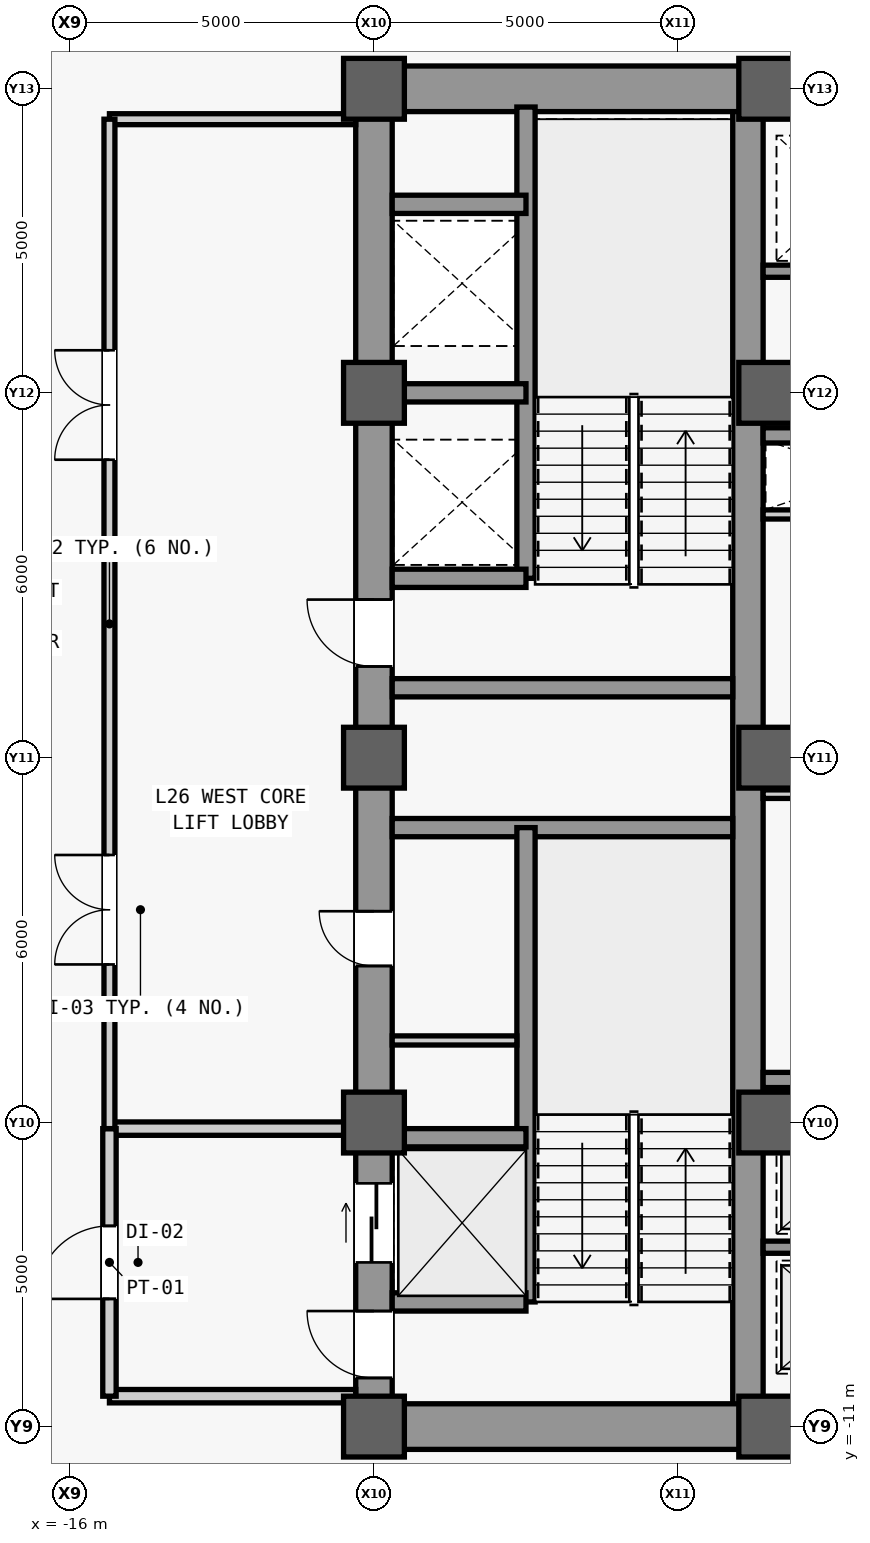
"""IFC4 building model, lengths in metres.
Left out: names, types, materials, properties, quantities, classifications, styles, units other than length and angle.
Written with IfcOpenShell. Run it as: python <this file> out.ifc"""

import sys

from ifc_helpers import new_model, si_unit, direction, frame, frame_2d, origin, origin_2d, place, context, subcontext, project, spatial, rectangle, extrude, source, transform, mapped, element, fill, save


model = new_model("IFC4")
c1 = context("Model", 3, precision=1e-05, world=origin(), true_north=direction((0.0, 1.0)))
c2 = subcontext(c1, "Body", "Model", "MODEL_VIEW")
j1 = project(units=[si_unit("LENGTHUNIT", "METRE"), si_unit("PLANEANGLEUNIT", "RADIAN")], contexts=[c1])
p1 = place(None, origin())
s1 = spatial("IfcSite", under=j1, at=p1, CompositionType="ELEMENT")
p2 = place(p1, origin())
s2 = spatial("IfcBuilding", under=s1, at=p2, CompositionType="ELEMENT")
p3 = place(p2, frame((0.0, 0.0, 116.0)))
s3 = spatial("IfcBuildingStorey", under=s2, at=p3, CompositionType="ELEMENT", Elevation=116.0)
m1 = source(origin(), c2, "Body", "SweptSolid", [
    extrude(rectangle(XDim=22.0, YDim=0.6, at=frame_2d((11.0, 0.0))), origin(), (0.0, 0.0, 1.0), 3.84),
])
p4 = place(p3, frame((-11.0, -11.0, 0.0), z_axis=(0.0, 0.0, 1.0), x_axis=(0.0, 1.0, 0.0)))
e1 = element("IfcWall", 1, at=p4, inside=s3, PredefinedType="SHEAR", context=c2, shape_type="MappedRepresentation", body=[
    mapped(m1, transform((0.0, 0.0, 0.0), scale=1.0)),
])
m2 = source(origin(), c2, "Body", "SweptSolid", [
    extrude(rectangle(XDim=1.1, YDim=2.2, at=frame_2d((0.55, 1.1))), frame((0.0, 0.31, 0.0), z_axis=(0.0, -1.0, 0.0), x_axis=(1.0, 0.0, 0.0)), (0.0, 0.0, 1.0), 0.62),
])
p5 = place(p4, frame((0.8, 0.0, 0.0)))
e2 = element("IfcOpeningElement", 2, at=p5, cuts=e1, PredefinedType="OPENING", context=c2, shape_type="MappedRepresentation", body=[
    mapped(m2, transform((0.0, 0.0, 0.0), scale=1.0)),
])
p6 = place(p4, frame((12.5, 0.0, 0.0)))
e3 = element("IfcOpeningElement", 3, at=p6, cuts=e1, PredefinedType="OPENING", context=c2, shape_type="MappedRepresentation", body=[
    mapped(m2, transform((0.0, 0.0, 0.0), scale=1.0)),
])
m3 = source(origin(), c2, "Body", "SweptSolid", [
    extrude(rectangle(XDim=0.9, YDim=2.15, at=frame_2d((0.45, 1.075))), frame((0.0, 0.31, 0.0), z_axis=(0.0, -1.0, 0.0), x_axis=(1.0, 0.0, 0.0)), (0.0, 0.0, 1.0), 0.62),
])
p7 = place(p4, frame((7.575, 0.0, 0.0)))
e4 = element("IfcOpeningElement", 4, at=p7, cuts=e1, PredefinedType="OPENING", context=c2, shape_type="MappedRepresentation", body=[
    mapped(m3, transform((0.0, 0.0, 0.0), scale=1.0)),
])
m4 = source(origin(), c2, "Body", "SweptSolid", [
    extrude(rectangle(XDim=1.3, YDim=2.3, at=frame_2d((0.65, 1.15))), frame((0.0, 0.31, 0.0), z_axis=(0.0, -1.0, 0.0), x_axis=(1.0, 0.0, 0.0)), (0.0, 0.0, 1.0), 0.62),
])
p8 = place(p4, frame((2.7, 0.0, 0.0)))
e5 = element("IfcOpeningElement", 5, at=p8, cuts=e1, PredefinedType="OPENING", context=c2, shape_type="MappedRepresentation", body=[
    mapped(m4, transform((0.0, 0.0, 0.0), scale=1.0)),
])
m5 = source(origin(), c2, "Body", "SweptSolid", [
    extrude(rectangle(XDim=21.4, YDim=0.5, at=frame_2d((10.7, 0.0))), origin(), (0.0, 0.0, 1.0), 3.84),
])
p9 = place(p3, frame((-4.85, -10.7, 0.0), z_axis=(0.0, 0.0, 1.0), x_axis=(0.0, 1.0, 0.0)))
e6 = element("IfcWall", 6, at=p9, inside=s3, PredefinedType="SHEAR", context=c2, shape_type="MappedRepresentation", body=[
    mapped(m5, transform((0.0, 0.0, 0.0), scale=1.0)),
])
m6 = source(origin(), c2, "Body", "SweptSolid", [
    extrude(rectangle(XDim=5.85, YDim=0.75, at=frame_2d((2.925, 0.0))), origin(), (0.0, 0.0, 1.0), 3.84),
])
for number, where, z_axis, x_axis in (
    (7, (-10.7, -11.0, 0.0), (0.0, 0.0, 1.0), (1.0, 0.0, 0.0)),
    (8, (-10.7, 11.0, 0.0), (0.0, 0.0, 1.0), (1.0, 0.0, 0.0)),
):
    element("IfcWall", number, at=place(p3, frame(where, z_axis=z_axis, x_axis=x_axis)), inside=s3, PredefinedType="SHEAR", context=c2, shape_type="MappedRepresentation", body=[
        mapped(m6, transform((0.0, 0.0, 0.0), scale=1.0)),
    ])
m7 = source(origin(), c2, "Body", "SweptSolid", [
    extrude(rectangle(XDim=5.6, YDim=0.3, at=frame_2d((2.8, 0.0))), origin(), (0.0, 0.0, 1.0), 3.84),
])
for number, where, z_axis, x_axis in (
    (9, (-10.7, -1.15, 0.0), (0.0, 0.0, 1.0), (1.0, 0.0, 0.0)),
    (10, (-10.7, 1.15, 0.0), (0.0, 0.0, 1.0), (1.0, 0.0, 0.0)),
):
    element("IfcWall", number, at=place(p3, frame(where, z_axis=z_axis, x_axis=x_axis)), inside=s3, PredefinedType="SHEAR", context=c2, shape_type="MappedRepresentation", body=[
        mapped(m7, transform((0.0, 0.0, 0.0), scale=1.0)),
    ])
m8 = source(origin(), c2, "Body", "SweptSolid", [
    extrude(rectangle(XDim=9.2, YDim=0.5, at=frame_2d((4.6, 0.0))), origin(), (0.0, 0.0, 1.0), 3.84),
])
p10 = place(p3, frame((-4.6, -11.0, 0.0), z_axis=(0.0, 0.0, 1.0), x_axis=(1.0, 0.0, 0.0)))
e11 = element("IfcWall", 11, at=p10, inside=s3, PredefinedType="SHEAR", context=c2, shape_type="MappedRepresentation", body=[
    mapped(m8, transform((0.0, 0.0, 0.0), scale=1.0)),
])
m9 = source(origin(), c2, "Body", "SweptSolid", [
    extrude(rectangle(XDim=1.8, YDim=2.25, at=frame_2d((0.9, 1.125))), frame((0.0, 0.26, 0.0), z_axis=(0.0, -1.0, 0.0), x_axis=(1.0, 0.0, 0.0)), (0.0, 0.0, 1.0), 0.52),
])
p11 = place(p10, frame((3.7, 0.0, 0.0)))
e12 = element("IfcOpeningElement", 12, at=p11, cuts=e11, PredefinedType="OPENING", context=c2, shape_type="MappedRepresentation", body=[
    mapped(m9, transform((0.0, 0.0, 0.0), scale=1.0)),
])
p12 = place(p3, frame((-4.6, 11.0, 0.0), z_axis=(0.0, 0.0, 1.0), x_axis=(1.0, 0.0, 0.0)))
e13 = element("IfcWall", 13, at=p12, inside=s3, PredefinedType="SHEAR", context=c2, shape_type="MappedRepresentation", body=[
    mapped(m8, transform((0.0, 0.0, 0.0), scale=1.0)),
])
p13 = place(p12, frame((3.7, 0.0, 0.0)))
e14 = element("IfcOpeningElement", 14, at=p13, cuts=e13, PredefinedType="OPENING", context=c2, shape_type="MappedRepresentation", body=[
    mapped(m9, transform((0.0, 0.0, 0.0), scale=1.0)),
])
m10 = source(origin(), c2, "Body", "SweptSolid", [
    extrude(rectangle(XDim=1.0, YDim=1.0, at=origin_2d()), origin(), (0.0, 0.0, 1.0), 4.1),
])
for number, where, z_axis, x_axis in (
    (15, (-11.0, -11.0, 0.0), (0.0, 0.0, 1.0), (1.0, 0.0, 0.0)),
    (16, (-11.0, -6.0, 0.0), (0.0, 0.0, 1.0), (1.0, 0.0, 0.0)),
    (17, (-11.0, 0.0, 0.0), (0.0, 0.0, 1.0), (1.0, 0.0, 0.0)),
    (18, (-11.0, 6.0, 0.0), (0.0, 0.0, 1.0), (1.0, 0.0, 0.0)),
    (19, (-11.0, 11.0, 0.0), (0.0, 0.0, 1.0), (1.0, 0.0, 0.0)),
    (20, (-4.5, -11.0, 0.0), (0.0, 0.0, 1.0), (1.0, 0.0, 0.0)),
    (21, (-4.5, -6.0, 0.0), (0.0, 0.0, 1.0), (1.0, 0.0, 0.0)),
    (22, (-4.5, 0.0, 0.0), (0.0, 0.0, 1.0), (1.0, 0.0, 0.0)),
    (23, (-4.5, 6.0, 0.0), (0.0, 0.0, 1.0), (1.0, 0.0, 0.0)),
    (24, (-4.5, 11.0, 0.0), (0.0, 0.0, 1.0), (1.0, 0.0, 0.0)),
):
    element("IfcColumn", number, at=place(p3, frame(where, z_axis=z_axis, x_axis=x_axis)), inside=s3, PredefinedType="COLUMN", context=c2, shape_type="MappedRepresentation", body=[
        mapped(m10, transform((0.0, 0.0, 0.0), scale=1.0)),
    ])
m11 = source(origin(), c2, "Body", "SweptSolid", [
    extrude(rectangle(XDim=7.8, YDim=0.3, at=frame_2d((3.9, 0.0))), origin(), (0.0, 0.0, 1.0), 3.84),
])
p14 = place(p3, frame((-8.5, -8.95, 0.0), z_axis=(0.0, 0.0, 1.0), x_axis=(0.0, 1.0, 0.0)))
e25 = element("IfcWall", 25, at=p14, inside=s3, PredefinedType="SHEAR", context=c2, shape_type="MappedRepresentation", body=[
    mapped(m11, transform((0.0, 0.0, 0.0), scale=1.0)),
])
m12 = source(origin(), c2, "Body", "SweptSolid", [
    extrude(rectangle(XDim=2.2, YDim=0.3, at=frame_2d((1.1, 0.0))), origin(), (0.0, 0.0, 1.0), 3.84),
])
for number, where, z_axis, x_axis in (
    (26, (-10.7, -8.95, 0.0), (0.0, 0.0, 1.0), (1.0, 0.0, 0.0)),
    (27, (-10.7, -6.25, 0.0), (0.0, 0.0, 1.0), (1.0, 0.0, 0.0)),
):
    element("IfcWall", number, at=place(p3, frame(where, z_axis=z_axis, x_axis=x_axis)), inside=s3, PredefinedType="SHEAR", context=c2, shape_type="MappedRepresentation", body=[
        mapped(m12, transform((0.0, 0.0, 0.0), scale=1.0)),
    ])
m13 = source(origin(), c2, "Body", "SweptSolid", [
    extrude(rectangle(XDim=7.75, YDim=0.3, at=frame_2d((3.875, 0.0))), origin(), (0.0, 0.0, 1.0), 3.84),
])
p15 = place(p3, frame((-8.5, 2.95, 0.0), z_axis=(0.0, 0.0, 1.0), x_axis=(0.0, 1.0, 0.0)))
e28 = element("IfcWall", 28, at=p15, inside=s3, PredefinedType="SHEAR", context=c2, shape_type="MappedRepresentation", body=[
    mapped(m13, transform((0.0, 0.0, 0.0), scale=1.0)),
])
for number, where, z_axis, x_axis in (
    (29, (-10.7, 2.95, 0.0), (0.0, 0.0, 1.0), (1.0, 0.0, 0.0)),
    (30, (-10.7, 6.0, 0.0), (0.0, 0.0, 1.0), (1.0, 0.0, 0.0)),
    (31, (-10.7, 9.1, 0.0), (0.0, 0.0, 1.0), (1.0, 0.0, 0.0)),
):
    element("IfcWall", number, at=place(p3, frame(where, z_axis=z_axis, x_axis=x_axis)), inside=s3, PredefinedType="SHEAR", context=c2, shape_type="MappedRepresentation", body=[
        mapped(m12, transform((0.0, 0.0, 0.0), scale=1.0)),
    ])
m14 = source(origin(), c2, "Body", "SweptSolid", [
    extrude(rectangle(XDim=2.05, YDim=0.15, at=frame_2d((1.025, 0.0))), origin(), (0.0, 0.0, 1.0), 3.84),
])
p16 = place(p3, frame((-10.7, -4.65, 0.0), z_axis=(0.0, 0.0, 1.0), x_axis=(1.0, 0.0, 0.0)))
e32 = element("IfcWall", 32, at=p16, inside=s3, PredefinedType="PARTITIONING", context=c2, shape_type="MappedRepresentation", body=[
    mapped(m14, transform((0.0, 0.0, 0.0), scale=1.0)),
])
m15 = source(origin(), c2, "Body", "SweptSolid", [
    extrude(rectangle(XDim=4.05, YDim=0.22, at=frame_2d((2.025, 0.0))), origin(), (0.0, 0.0, 1.0), 3.84),
])
p17 = place(p3, frame((-15.35, -10.5, 0.0), z_axis=(0.0, 0.0, 1.0), x_axis=(1.0, 0.0, 0.0)))
e33 = element("IfcWall", 33, at=p17, inside=s3, PredefinedType="PARTITIONING", context=c2, shape_type="MappedRepresentation", body=[
    mapped(m15, transform((0.0, 0.0, 0.0), scale=1.0)),
])
m16 = source(origin(), c2, "Body", "SweptSolid", [
    extrude(rectangle(XDim=4.05, YDim=0.22, at=frame_2d((2.025, 0.0))), origin(), (0.0, 0.0, 1.0), 3.067),
])
p18 = place(p3, frame((-15.35, -6.1, 0.0), z_axis=(0.0, 0.0, 1.0), x_axis=(1.0, 0.0, 0.0)))
e34 = element("IfcWall", 34, at=p18, inside=s3, PredefinedType="PARTITIONING", context=c2, shape_type="MappedRepresentation", body=[
    mapped(m16, transform((0.0, 0.0, 0.0), scale=1.0)),
])
m17 = source(origin(), c2, "Body", "SweptSolid", [
    extrude(rectangle(XDim=4.4, YDim=0.22, at=frame_2d((2.2, 0.0))), origin(), (0.0, 0.0, 1.0), 3.84),
])
p19 = place(p3, frame((-15.35, -10.5, 0.0), z_axis=(0.0, 0.0, 1.0), x_axis=(0.0, 1.0, 0.0)))
e35 = element("IfcWall", 35, at=p19, inside=s3, PredefinedType="PARTITIONING", context=c2, shape_type="MappedRepresentation", body=[
    mapped(m17, transform((0.0, 0.0, 0.0), scale=1.0)),
])
m18 = source(origin(), c2, "Body", "SweptSolid", [
    extrude(rectangle(XDim=1.2, YDim=2.2, at=frame_2d((0.6, 1.1))), frame((0.0, 0.12, 0.0), z_axis=(0.0, -1.0, 0.0), x_axis=(1.0, 0.0, 0.0)), (0.0, 0.0, 1.0), 0.24),
])
p20 = place(p19, frame((1.6, 0.0, 0.0)))
e36 = element("IfcOpeningElement", 36, at=p20, cuts=e35, PredefinedType="OPENING", context=c2, shape_type="MappedRepresentation", body=[
    mapped(m18, transform((0.0, 0.0, 0.0), scale=1.0)),
])
m19 = source(origin(), c2, "Body", "SweptSolid", [
    extrude(rectangle(XDim=4.05, YDim=0.18, at=frame_2d((2.025, 0.0))), origin(), (0.0, 0.0, 1.0), 3.84),
])
p21 = place(p3, frame((-15.35, 10.5, 0.0), z_axis=(0.0, 0.0, 1.0), x_axis=(1.0, 0.0, 0.0)))
e37 = element("IfcWall", 37, at=p21, inside=s3, PredefinedType="PARTITIONING", context=c2, shape_type="MappedRepresentation", body=[
    mapped(m19, transform((0.0, 0.0, 0.0), scale=1.0)),
])
m20 = source(origin(), c2, "Body", "SweptSolid", [
    extrude(rectangle(XDim=16.6, YDim=0.18, at=frame_2d((8.3, 0.0))), origin(), (0.0, 0.0, 1.0), 3.84),
])
p22 = place(p3, frame((-15.35, -6.1, 0.0), z_axis=(0.0, 0.0, 1.0), x_axis=(0.0, 1.0, 0.0)))
e38 = element("IfcWall", 38, at=p22, inside=s3, PredefinedType="PARTITIONING", context=c2, shape_type="MappedRepresentation", body=[
    mapped(m20, transform((0.0, 0.0, 0.0), scale=1.0)),
])
m21 = source(origin(), c2, "Body", "SweptSolid", [
    extrude(rectangle(XDim=1.8, YDim=2.25, at=frame_2d((0.9, 1.125))), frame((0.0, 0.1, 0.0), z_axis=(0.0, -1.0, 0.0), x_axis=(1.0, 0.0, 0.0)), (0.0, 0.0, 1.0), 0.2),
])
p23 = place(p22, frame((2.7, 0.0, 0.0)))
e39 = element("IfcOpeningElement", 39, at=p23, cuts=e38, PredefinedType="OPENING", context=c2, shape_type="MappedRepresentation", body=[
    mapped(m21, transform((0.0, 0.0, 0.0), scale=1.0)),
])
p24 = place(p22, frame((11.0, 0.0, 0.0)))
e40 = element("IfcOpeningElement", 40, at=p24, cuts=e38, PredefinedType="OPENING", context=c2, shape_type="MappedRepresentation", body=[
    mapped(m21, transform((0.0, 0.0, 0.0), scale=1.0)),
])
m22 = source(origin(), c2, "Body", "SweptSolid", [
    extrude(rectangle(XDim=3.45, YDim=0.15, at=frame_2d((1.725, 0.0))), origin(), (0.0, 0.0, 1.0), 3.84),
])
p25 = place(p3, frame((-4.6, 4.0, 0.0), z_axis=(0.0, 0.0, 1.0), x_axis=(1.0, 0.0, 0.0)))
e41 = element("IfcWall", 41, at=p25, inside=s3, PredefinedType="PARTITIONING", context=c2, shape_type="MappedRepresentation", body=[
    mapped(m22, transform((0.0, 0.0, 0.0), scale=1.0)),
])
m23 = source(origin(), c2, "Body", "SweptSolid", [
    extrude(rectangle(XDim=2.45, YDim=0.2, at=frame_2d((1.225, 0.0))), origin(), (0.0, 0.0, 1.0), 3.84),
])
p26 = place(p3, frame((-4.6, -8.05, 0.0), z_axis=(0.0, 0.0, 1.0), x_axis=(1.0, 0.0, 0.0)))
e42 = element("IfcWall", 42, at=p26, inside=s3, PredefinedType="SHEAR", context=c2, shape_type="MappedRepresentation", body=[
    mapped(m23, transform((0.0, 0.0, 0.0), scale=1.0)),
])
m24 = source(origin(), c2, "Body", "SweptSolid", [
    extrude(rectangle(XDim=9.2, YDim=0.25, at=frame_2d((4.6, 0.0))), origin(), (0.0, 0.0, 1.0), 3.84),
])
p27 = place(p3, frame((-4.6, -5.3, 0.0), z_axis=(0.0, 0.0, 1.0), x_axis=(1.0, 0.0, 0.0)))
e43 = element("IfcWall", 43, at=p27, inside=s3, PredefinedType="SHEAR", context=c2, shape_type="MappedRepresentation", body=[
    mapped(m24, transform((0.0, 0.0, 0.0), scale=1.0)),
])
m25 = source(origin(), c2, "Body", "SweptSolid", [
    extrude(rectangle(XDim=1.05, YDim=2.2, at=frame_2d((0.525, 1.1))), frame((0.0, 0.135, 0.0), z_axis=(0.0, -1.0, 0.0), x_axis=(1.0, 0.0, 0.0)), (0.0, 0.0, 1.0), 0.27),
])
p28 = place(p27, frame((4.075, 0.0, 0.0)))
e44 = element("IfcOpeningElement", 44, at=p28, cuts=e43, PredefinedType="OPENING", context=c2, shape_type="MappedRepresentation", body=[
    mapped(m25, transform((0.0, 0.0, 0.0), scale=1.0)),
])
p29 = place(p3, frame((-4.6, 8.0, 0.0), z_axis=(0.0, 0.0, 1.0), x_axis=(1.0, 0.0, 0.0)))
e45 = element("IfcWall", 45, at=p29, inside=s3, PredefinedType="SHEAR", context=c2, shape_type="MappedRepresentation", body=[
    mapped(m23, transform((0.0, 0.0, 0.0), scale=1.0)),
])
p30 = place(p3, frame((-4.6, 5.3, 0.0), z_axis=(0.0, 0.0, 1.0), x_axis=(1.0, 0.0, 0.0)))
e46 = element("IfcWall", 46, at=p30, inside=s3, PredefinedType="SHEAR", context=c2, shape_type="MappedRepresentation", body=[
    mapped(m24, transform((0.0, 0.0, 0.0), scale=1.0)),
])
p31 = place(p30, frame((4.075, 0.0, 0.0)))
e47 = element("IfcOpeningElement", 47, at=p31, cuts=e46, PredefinedType="OPENING", context=c2, shape_type="MappedRepresentation", body=[
    mapped(m25, transform((0.0, 0.0, 0.0), scale=1.0)),
])
m26 = source(origin(), c2, "Body", "SweptSolid", [
    extrude(rectangle(XDim=3.45, YDim=0.14, at=frame_2d((1.725, 0.0))), origin(), (0.0, 0.0, 1.0), 3.84),
])
p32 = place(p3, frame((-4.6, -0.6, 0.0), z_axis=(0.0, 0.0, 1.0), x_axis=(1.0, 0.0, 0.0)))
e48 = element("IfcWall", 48, at=p32, inside=s3, PredefinedType="PARTITIONING", context=c2, shape_type="MappedRepresentation", body=[
    mapped(m26, transform((0.0, 0.0, 0.0), scale=1.0)),
])
m27 = source(origin(), c2, "Body", "SweptSolid", [
    extrude(rectangle(XDim=1.1, YDim=2.2, at=frame_2d((0.55, 1.1))), frame((0.0, 0.025, 0.0), z_axis=(0.0, -1.0, 0.0), x_axis=(1.0, 0.0, 0.0)), (0.0, 0.0, 1.0), 0.05),
])
p33 = place(p5, origin())
e49 = element("IfcDoor", 49, at=p33, inside=s3, OperationType="SINGLE_SWING_RIGHT", PredefinedType="DOOR", context=c2, shape_type="MappedRepresentation", body=[
    mapped(m27, transform((0.0, 0.0, 0.0), scale=1.0)),
])
fill(e2, e49)
p34 = place(p6, origin())
e50 = element("IfcDoor", 50, at=p34, inside=s3, OperationType="SINGLE_SWING_RIGHT", PredefinedType="DOOR", context=c2, shape_type="MappedRepresentation", body=[
    mapped(m27, transform((0.0, 0.0, 0.0), scale=1.0)),
])
fill(e3, e50)
m28 = source(origin(), c2, "Body", "SweptSolid", [
    extrude(rectangle(XDim=0.9, YDim=2.15, at=frame_2d((0.45, 1.075))), frame((0.0, 0.025, 0.0), z_axis=(0.0, -1.0, 0.0), x_axis=(1.0, 0.0, 0.0)), (0.0, 0.0, 1.0), 0.05),
])
p35 = place(p7, origin())
e51 = element("IfcDoor", 51, at=p35, inside=s3, OperationType="SINGLE_SWING_RIGHT", PredefinedType="DOOR", context=c2, shape_type="MappedRepresentation", body=[
    mapped(m28, transform((0.0, 0.0, 0.0), scale=1.0)),
])
fill(e4, e51)
m29 = source(origin(), c2, "Body", "SweptSolid", [
    extrude(rectangle(XDim=1.2, YDim=2.2, at=frame_2d((0.6, 1.1))), frame((0.0, 0.025, 0.0), z_axis=(0.0, -1.0, 0.0), x_axis=(1.0, 0.0, 0.0)), (0.0, 0.0, 1.0), 0.05),
])
p36 = place(p20, origin())
e52 = element("IfcDoor", 52, at=p36, inside=s3, OperationType="SINGLE_SWING_LEFT", PredefinedType="DOOR", context=c2, shape_type="MappedRepresentation", body=[
    mapped(m29, transform((0.0, 0.0, 0.0), scale=1.0)),
])
fill(e36, e52)
m30 = source(origin(), c2, "Body", "SweptSolid", [
    extrude(rectangle(XDim=1.8, YDim=2.25, at=frame_2d((0.9, 1.125))), frame((0.0, 0.025, 0.0), z_axis=(0.0, -1.0, 0.0), x_axis=(1.0, 0.0, 0.0)), (0.0, 0.0, 1.0), 0.05),
])
p37 = place(p23, origin())
e53 = element("IfcDoor", 53, at=p37, inside=s3, OperationType="SINGLE_SWING_LEFT", PredefinedType="DOOR", context=c2, shape_type="MappedRepresentation", body=[
    mapped(m30, transform((0.0, 0.0, 0.0), scale=1.0)),
])
fill(e39, e53)
p38 = place(p24, origin())
e54 = element("IfcDoor", 54, at=p38, inside=s3, OperationType="SINGLE_SWING_RIGHT", PredefinedType="DOOR", context=c2, shape_type="MappedRepresentation", body=[
    mapped(m30, transform((0.0, 0.0, 0.0), scale=1.0)),
])
fill(e40, e54)
m31 = source(origin(), c2, "Body", "SweptSolid", [
    extrude(rectangle(XDim=1.3, YDim=2.3, at=frame_2d((0.65, 1.15))), frame((0.0, 0.025, 0.0), z_axis=(0.0, -1.0, 0.0), x_axis=(1.0, 0.0, 0.0)), (0.0, 0.0, 1.0), 0.05),
])
p39 = place(p8, origin())
e55 = element("IfcDoor", 55, at=p39, inside=s3, OperationType="SLIDING_TO_LEFT", PredefinedType="DOOR", context=c2, shape_type="MappedRepresentation", body=[
    mapped(m31, transform((0.0, 0.0, 0.0), scale=1.0)),
])
fill(e5, e55)
save(model, sys.argv[1])
